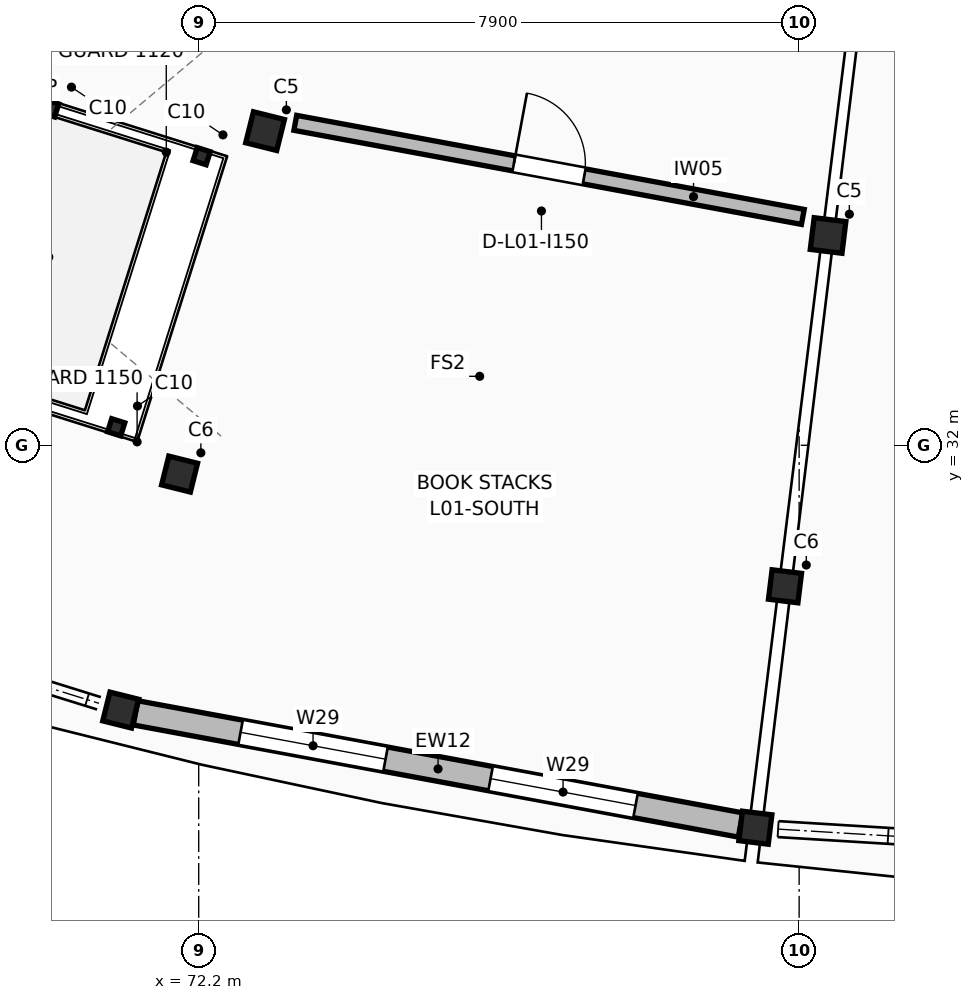
"""IFC4 building model, lengths in metres.
Left out: names, types, materials, properties, quantities, classifications, styles, units other than length and angle.
Written with IfcOpenShell. Run it as: python <this file> out.ifc"""

import sys

from ifc_helpers import new_model, si_unit, direction, frame, frame_2d, origin, origin_2d, place, context, subcontext, project, spatial, rectangle, hollow_rectangle, extrude, element, fill, save


model = new_model("IFC4")
c1 = context("Model", 3, precision=1e-05, world=origin(), true_north=direction((0.0, 1.0)))
c2 = subcontext(c1, "Body", "Model", "MODEL_VIEW")
j1 = project(units=[si_unit("LENGTHUNIT", "METRE"), si_unit("PLANEANGLEUNIT", "RADIAN")], contexts=[c1])
p1 = place(None, origin())
s1 = spatial("IfcSite", under=j1, at=p1, CompositionType="ELEMENT")
p2 = place(p1, origin())
s2 = spatial("IfcBuilding", under=s1, at=p2, CompositionType="ELEMENT")
p3 = place(p2, frame((0.0, 0.0, 4.42)))
s3 = spatial("IfcBuildingStorey", under=s2, at=p3, CompositionType="ELEMENT", Elevation=4.42)
p4 = place(p3, frame((73.073, 36.133, 0.0), z_axis=(0.0, 0.0, 1.0), x_axis=(-0.2419218956, -0.970295726276, 0.0)))
e1 = element("IfcColumn", 1, at=p4, inside=s3, PredefinedType="COLUMN", context=c2, shape_type="SweptSolid", body=[
    extrude(rectangle(XDim=0.42, YDim=0.42, at=origin_2d()), origin(), (0.0, 0.0, 1.0), 3.74),
])
for number, where, z_axis, x_axis in (
    (2, (71.948, 31.621, 0.0), (0.0, 0.0, 1.0), (-0.242, -0.97, 0.0)),
    (3, (71.174, 28.516, 0.0), (0.0, 0.0, 1.0), (-0.242, -0.97, 0.0)),
):
    element("IfcColumn", number, at=place(p3, frame(where, z_axis=z_axis, x_axis=x_axis)), inside=s3, PredefinedType="COLUMN", context=c2, shape_type="SweptSolid", body=[
        extrude(rectangle(XDim=0.39, YDim=0.39, at=origin_2d()), origin(), (0.0, 0.0, 1.0), 3.74),
    ])
p5 = place(p3, frame((80.481, 34.76, 0.0), z_axis=(0.0, 0.0, 1.0), x_axis=(-0.121869343405, -0.992546151641, 0.0)))
e4 = element("IfcColumn", 4, at=p5, inside=s3, PredefinedType="COLUMN", context=c2, shape_type="SweptSolid", body=[
    extrude(rectangle(XDim=0.42, YDim=0.42, at=origin_2d()), origin(), (0.0, 0.0, 1.0), 3.74),
])
for number, where, z_axis, x_axis in (
    (5, (79.914, 30.145, 0.0), (0.0, 0.0, 1.0), (-0.122, -0.993, 0.0)),
    (6, (79.524, 26.969, 0.0), (0.0, 0.0, 1.0), (-0.122, -0.993, 0.0)),
):
    element("IfcColumn", number, at=place(p3, frame(where, z_axis=z_axis, x_axis=x_axis)), inside=s3, PredefinedType="COLUMN", context=c2, shape_type="SweptSolid", body=[
        extrude(rectangle(XDim=0.39, YDim=0.39, at=origin_2d()), origin(), (0.0, 0.0, 1.0), 3.74),
    ])
p6 = place(p3, frame((71.369, 28.48, 0.0), z_axis=(0.0, 0.0, 1.0), x_axis=(0.983254797115, -0.182236121422, 0.0)))
e7 = element("IfcWall", 7, at=p6, inside=s3, PredefinedType="STANDARD", context=c2, shape_type="SweptSolid", body=[
    extrude(rectangle(XDim=8.096, YDim=0.324, at=frame_2d((4.048, 0.0))), origin(), (0.0, 0.0, 1.0), 2.78),
])
p7 = place(p6, frame((1.405, 0.0, 0.95)))
e8 = element("IfcOpeningElement", 8, at=p7, cuts=e7, PredefinedType="OPENING", context=c2, shape_type="SweptSolid", body=[
    extrude(rectangle(XDim=1.94, YDim=1.15, at=frame_2d((0.97, 0.575))), frame((0.0, 0.172, 0.0), z_axis=(0.0, -1.0, 0.0), x_axis=(1.0, 0.0, 0.0)), (0.0, 0.0, 1.0), 0.344),
])
p8 = place(p6, frame((4.75, 0.0, 0.95)))
e9 = element("IfcOpeningElement", 9, at=p8, cuts=e7, PredefinedType="OPENING", context=c2, shape_type="SweptSolid", body=[
    extrude(rectangle(XDim=1.94, YDim=1.15, at=frame_2d((0.97, 0.575))), frame((0.0, 0.172, 0.0), z_axis=(0.0, -1.0, 0.0), x_axis=(1.0, 0.0, 0.0)), (0.0, 0.0, 1.0), 0.344),
])
for number, where, z_axis, x_axis in (
    (10, (70.246, 36.432, 0.0), (0.0, 0.0, 1.0), (0.954, -0.301, 0.0)),
    (11, (71.115, 32.236, 0.0), (0.0, 0.0, 1.0), (0.954, -0.301, 0.0)),
    (12, (72.239, 35.803, 0.0), (0.0, 0.0, 1.0), (0.954, -0.301, 0.0)),
):
    element("IfcColumn", number, at=place(p3, frame(where, z_axis=z_axis, x_axis=x_axis)), inside=s3, PredefinedType="COLUMN", context=c2, shape_type="SweptSolid", body=[
        extrude(hollow_rectangle(XDim=0.18, YDim=0.18, WallThickness=0.01, InnerFilletRadius=0.01, OuterFilletRadius=0.02, at=origin_2d()), origin(), (0.0, 0.0, 1.0), 3.74),
    ])
p9 = place(p3, frame((73.471, 36.242, 0.0), z_axis=(0.0, 0.0, 1.0), x_axis=(0.983257442509, -0.182221847619, 0.0)))
e13 = element("IfcWall", 13, at=p9, inside=s3, PredefinedType="STANDARD", context=c2, shape_type="SweptSolid", body=[
    extrude(rectangle(XDim=6.792, YDim=0.2, at=frame_2d((3.396, 0.0))), origin(), (0.0, 0.0, 1.0), 2.75),
])
p10 = place(p9, frame((2.926, 0.0, 0.0)))
e14 = element("IfcOpeningElement", 14, at=p10, cuts=e13, PredefinedType="OPENING", context=c2, shape_type="SweptSolid", body=[
    extrude(rectangle(XDim=0.94, YDim=2.18, at=frame_2d((0.47, 1.09))), frame((0.0, 0.11, 0.0), z_axis=(0.0, -1.0, 0.0), x_axis=(1.0, 0.0, 0.0)), (0.0, 0.0, 1.0), 0.22),
])
p11 = place(p7, origin())
e15 = element("IfcWindow", 15, at=p11, inside=s3, PartitioningType="SINGLE_PANEL", PredefinedType="WINDOW", context=c2, shape_type="SweptSolid", body=[
    extrude(rectangle(XDim=1.94, YDim=1.15, at=frame_2d((0.97, 0.575))), frame((0.0, 0.03, 0.0), z_axis=(0.0, -1.0, 0.0), x_axis=(1.0, 0.0, 0.0)), (0.0, 0.0, 1.0), 0.06),
])
fill(e8, e15)
p12 = place(p8, origin())
e16 = element("IfcWindow", 16, at=p12, inside=s3, PartitioningType="SINGLE_PANEL", PredefinedType="WINDOW", context=c2, shape_type="SweptSolid", body=[
    extrude(rectangle(XDim=1.94, YDim=1.15, at=frame_2d((0.97, 0.575))), frame((0.0, 0.03, 0.0), z_axis=(0.0, -1.0, 0.0), x_axis=(1.0, 0.0, 0.0)), (0.0, 0.0, 1.0), 0.06),
])
fill(e9, e16)
p13 = place(p10, origin())
e17 = element("IfcDoor", 17, at=p13, inside=s3, OperationType="SINGLE_SWING_LEFT", PredefinedType="DOOR", context=c2, shape_type="SweptSolid", body=[
    extrude(rectangle(XDim=0.94, YDim=2.18, at=frame_2d((0.47, 1.09))), frame((0.0, 0.025, 0.0), z_axis=(0.0, -1.0, 0.0), x_axis=(1.0, 0.0, 0.0)), (0.0, 0.0, 1.0), 0.05),
])
fill(e14, e17)
save(model, sys.argv[1])
